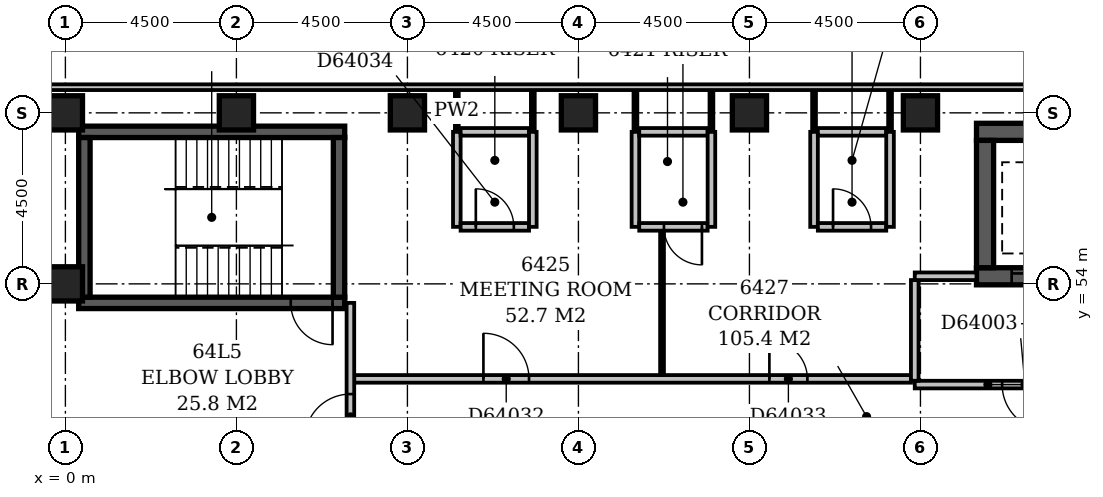
"""IFC4 building model, lengths in metres.
Left out: names, types, materials, properties, quantities, classifications, styles, units other than length and angle.
Written with IfcOpenShell. Run it as: python <this file> out.ifc"""

import sys

from ifc_helpers import new_model, si_unit, direction, frame, frame_2d, origin, origin_2d, place, context, subcontext, project, spatial, rectangle, extrude, element, fill, save


model = new_model("IFC4")
c1 = context("Model", 3, precision=1e-05, world=origin(), true_north=direction((0.0, 1.0)))
c2 = subcontext(c1, "Body", "Model", "MODEL_VIEW")
j1 = project(units=[si_unit("LENGTHUNIT", "METRE"), si_unit("PLANEANGLEUNIT", "RADIAN")], contexts=[c1])
p1 = place(None, origin())
s1 = spatial("IfcSite", under=j1, at=p1, CompositionType="ELEMENT")
p2 = place(p1, origin())
s2 = spatial("IfcBuilding", under=s1, at=p2, CompositionType="ELEMENT")
p3 = place(p2, frame((0.0, 0.0, 247.4)))
s3 = spatial("IfcBuildingStorey", under=s2, at=p3, CompositionType="ELEMENT", Elevation=247.4)
p4 = place(p3, frame((0.35, 53.5, -0.3), z_axis=(0.0, 0.0, 1.0), x_axis=(1.0, 0.0, 0.0)))
e1 = element("IfcWall", 1, at=p4, inside=s3, PredefinedType="SHEAR", context=c2, shape_type="SweptSolid", body=[
    extrude(rectangle(XDim=7.0, YDim=0.3, at=frame_2d((3.5, 0.0))), origin(), (0.0, 0.0, 1.0), 3.6),
])
p5 = place(p4, frame((5.58, 0.0, 0.3)))
e2 = element("IfcOpeningElement", 2, at=p5, cuts=e1, PredefinedType="OPENING", context=c2, shape_type="SweptSolid", body=[
    extrude(rectangle(XDim=1.1, YDim=2.1, at=frame_2d((0.55, 1.05))), frame((0.0, 0.162, 0.0), z_axis=(0.0, -1.0, 0.0), x_axis=(1.0, 0.0, 0.0)), (0.0, 0.0, 1.0), 0.324),
])
p6 = place(p3, frame((0.35, 58.0, -0.3), z_axis=(0.0, 0.0, 1.0), x_axis=(1.0, 0.0, 0.0)))
e3 = element("IfcWall", 3, at=p6, inside=s3, PredefinedType="SHEAR", context=c2, shape_type="SweptSolid", body=[
    extrude(rectangle(XDim=7.0, YDim=0.3, at=frame_2d((3.5, 0.0))), origin(), (0.0, 0.0, 1.0), 3.6),
])
for number, where, z_axis, x_axis in (
    (4, (0.5, 53.65, -0.3), (0.0, 0.0, 1.0), (0.0, 1.0, 0.0)),
    (5, (7.2, 53.65, -0.3), (0.0, 0.0, 1.0), (0.0, 1.0, 0.0)),
):
    element("IfcWall", number, at=place(p3, frame(where, z_axis=z_axis, x_axis=x_axis)), inside=s3, PredefinedType="SHEAR", context=c2, shape_type="SweptSolid", body=[
        extrude(rectangle(XDim=4.2, YDim=0.3, at=frame_2d((2.1, 0.0))), origin(), (0.0, 0.0, 1.0), 3.6),
    ])
p7 = place(p3, frame((23.975, 54.2, -0.3), z_axis=(0.0, 0.0, 1.0), x_axis=(1.0, 0.0, 0.0)))
e6 = element("IfcWall", 6, at=p7, inside=s3, PredefinedType="SHEAR", context=c2, shape_type="SweptSolid", body=[
    extrude(rectangle(XDim=2.95, YDim=0.45, at=frame_2d((1.475, 0.0))), origin(), (0.0, 0.0, 1.0), 3.6),
])
p8 = place(p7, frame((0.925, 0.0, 0.3)))
e7 = element("IfcOpeningElement", 7, at=p8, cuts=e6, PredefinedType="OPENING", context=c2, shape_type="SweptSolid", body=[
    extrude(rectangle(XDim=1.1, YDim=2.1, at=frame_2d((0.55, 1.05))), frame((0.0, 0.237, 0.0), z_axis=(0.0, -1.0, 0.0), x_axis=(1.0, 0.0, 0.0)), (0.0, 0.0, 1.0), 0.474),
])
p9 = place(p3, frame((23.975, 58.0, -0.3), z_axis=(0.0, 0.0, 1.0), x_axis=(1.0, 0.0, 0.0)))
e8 = element("IfcWall", 8, at=p9, inside=s3, PredefinedType="SHEAR", context=c2, shape_type="SweptSolid", body=[
    extrude(rectangle(XDim=2.95, YDim=0.45, at=frame_2d((1.475, 0.0))), origin(), (0.0, 0.0, 1.0), 3.6),
])
p10 = place(p3, frame((24.2, 54.425, -0.3), z_axis=(0.0, 0.0, 1.0), x_axis=(0.0, 1.0, 0.0)))
e9 = element("IfcWall", 9, at=p10, inside=s3, PredefinedType="SHEAR", context=c2, shape_type="SweptSolid", body=[
    extrude(rectangle(XDim=3.35, YDim=0.45, at=frame_2d((1.675, 0.0))), origin(), (0.0, 0.0, 1.0), 3.6),
])
for number, where, z_axis, x_axis in (
    (10, (0.0, 54.0, -0.3), (0.0, 0.0, 1.0), (1.0, 0.0, 0.0)),
    (11, (0.0, 58.5, -0.3), (0.0, 0.0, 1.0), (1.0, 0.0, 0.0)),
    (12, (4.5, 58.5, -0.3), (0.0, 0.0, 1.0), (1.0, 0.0, 0.0)),
    (13, (9.0, 58.5, -0.3), (0.0, 0.0, 1.0), (1.0, 0.0, 0.0)),
    (14, (13.5, 58.5, -0.3), (0.0, 0.0, 1.0), (1.0, 0.0, 0.0)),
    (15, (18.0, 58.5, -0.3), (0.0, 0.0, 1.0), (1.0, 0.0, 0.0)),
    (16, (22.5, 58.5, -0.3), (0.0, 0.0, 1.0), (1.0, 0.0, 0.0)),
):
    element("IfcColumn", number, at=place(p3, frame(where, z_axis=z_axis, x_axis=x_axis)), inside=s3, PredefinedType="COLUMN", context=c2, shape_type="SweptSolid", body=[
        extrude(rectangle(XDim=0.9, YDim=0.9, at=origin_2d()), origin(), (0.0, 0.0, 1.0), 3.6),
    ])
p11 = place(p3, frame((27.0, 59.175, 0.0), z_axis=(0.0, 0.0, 1.0), x_axis=(-1.0, 0.0, 0.0)))
e17 = element("IfcWall", 17, at=p11, inside=s3, PredefinedType="STANDARD", context=c2, shape_type="SweptSolid", body=[
    extrude(rectangle(XDim=27.75, YDim=0.15, at=frame_2d((13.875, 0.0))), origin(), (0.0, 0.0, 1.0), 2.7),
])
p12 = place(p3, frame((22.35, 51.35, 0.0), z_axis=(0.0, 0.0, 1.0), x_axis=(1.0, 0.0, 0.0)))
e18 = element("IfcWall", 18, at=p12, inside=s3, PredefinedType="PARTITIONING", context=c2, shape_type="SweptSolid", body=[
    extrude(rectangle(XDim=3.85, YDim=0.2, at=frame_2d((1.925, 0.0))), origin(), (0.0, 0.0, 1.0), 3.3),
])
p13 = place(p12, frame((2.3, 0.0, 0.0)))
e19 = element("IfcOpeningElement", 19, at=p13, cuts=e18, PredefinedType="OPENING", context=c2, shape_type="SweptSolid", body=[
    extrude(rectangle(XDim=1.2, YDim=2.1, at=frame_2d((0.6, 1.05))), frame((0.0, 0.112, 0.0), z_axis=(0.0, -1.0, 0.0), x_axis=(1.0, 0.0, 0.0)), (0.0, 0.0, 1.0), 0.224),
])
p14 = place(p3, frame((22.35, 54.2, 0.0), z_axis=(0.0, 0.0, 1.0), x_axis=(1.0, 0.0, 0.0)))
e20 = element("IfcWall", 20, at=p14, inside=s3, PredefinedType="PARTITIONING", context=c2, shape_type="SweptSolid", body=[
    extrude(rectangle(XDim=1.625, YDim=0.2, at=frame_2d((0.812, 0.0))), origin(), (0.0, 0.0, 1.0), 3.3),
])
p15 = place(p3, frame((22.35, 51.45, 0.0), z_axis=(0.0, 0.0, 1.0), x_axis=(0.0, 1.0, 0.0)))
e21 = element("IfcWall", 21, at=p15, inside=s3, PredefinedType="PARTITIONING", context=c2, shape_type="SweptSolid", body=[
    extrude(rectangle(XDim=2.65, YDim=0.2, at=frame_2d((1.325, 0.0))), origin(), (0.0, 0.0, 1.0), 3.3),
])
p16 = place(p3, frame((7.5, 49.6, 0.0), z_axis=(0.0, 0.0, 1.0), x_axis=(0.0, 1.0, 0.0)))
e22 = element("IfcWall", 22, at=p16, inside=s3, PredefinedType="PARTITIONING", context=c2, shape_type="SweptSolid", body=[
    extrude(rectangle(XDim=3.9, YDim=0.2, at=frame_2d((1.95, 0.0))), origin(), (0.0, 0.0, 1.0), 3.3),
])
p17 = place(p16, frame((0.3, 0.0, 0.0)))
e23 = element("IfcOpeningElement", 23, at=p17, cuts=e22, PredefinedType="OPENING", context=c2, shape_type="SweptSolid", body=[
    extrude(rectangle(XDim=1.2, YDim=2.1, at=frame_2d((0.6, 1.05))), frame((0.0, 0.112, 0.0), z_axis=(0.0, -1.0, 0.0), x_axis=(1.0, 0.0, 0.0)), (0.0, 0.0, 1.0), 0.224),
])
p18 = place(p3, frame((7.6, 51.5, 0.0), z_axis=(0.0, 0.0, 1.0), x_axis=(1.0, 0.0, 0.0)))
e24 = element("IfcWall", 24, at=p18, inside=s3, PredefinedType="PARTITIONING", context=c2, shape_type="SweptSolid", body=[
    extrude(rectangle(XDim=14.65, YDim=0.2, at=frame_2d((7.325, 0.0))), origin(), (0.0, 0.0, 1.0), 3.3),
])
p19 = place(p18, frame((3.4, 0.0, 0.0)))
e25 = element("IfcOpeningElement", 25, at=p19, cuts=e24, PredefinedType="OPENING", context=c2, shape_type="SweptSolid", body=[
    extrude(rectangle(XDim=1.2, YDim=2.1, at=frame_2d((0.6, 1.05))), frame((0.0, 0.112, 0.0), z_axis=(0.0, -1.0, 0.0), x_axis=(1.0, 0.0, 0.0)), (0.0, 0.0, 1.0), 0.224),
])
p20 = place(p18, frame((10.925, 0.0, 0.0)))
e26 = element("IfcOpeningElement", 26, at=p20, cuts=e24, PredefinedType="OPENING", context=c2, shape_type="SweptSolid", body=[
    extrude(rectangle(XDim=1.0, YDim=2.1, at=frame_2d((0.5, 1.05))), frame((0.0, 0.112, 0.0), z_axis=(0.0, -1.0, 0.0), x_axis=(1.0, 0.0, 0.0)), (0.0, 0.0, 1.0), 0.224),
])
p21 = place(p3, frame((15.7, 51.6, 0.0), z_axis=(0.0, 0.0, 1.0), x_axis=(0.0, 1.0, 0.0)))
e27 = element("IfcWall", 27, at=p21, inside=s3, PredefinedType="PARTITIONING", context=c2, shape_type="SweptSolid", body=[
    extrude(rectangle(XDim=3.8, YDim=0.1, at=frame_2d((1.9, 0.0))), origin(), (0.0, 0.0, 1.0), 3.3),
])
p22 = place(p3, frame((10.3, 55.5, 0.0), z_axis=(0.0, 0.0, 1.0), x_axis=(0.0, 1.0, 0.0)))
e28 = element("IfcWall", 28, at=p22, inside=s3, PredefinedType="PARTITIONING", context=c2, shape_type="SweptSolid", body=[
    extrude(rectangle(XDim=2.5, YDim=0.2, at=frame_2d((1.25, 0.0))), origin(), (0.0, 0.0, 1.0), 3.3),
])
p23 = place(p3, frame((10.4, 55.5, 0.0), z_axis=(0.0, 0.0, 1.0), x_axis=(1.0, 0.0, 0.0)))
e29 = element("IfcWall", 29, at=p23, inside=s3, PredefinedType="PARTITIONING", context=c2, shape_type="SweptSolid", body=[
    extrude(rectangle(XDim=1.8, YDim=0.2, at=frame_2d((0.9, 0.0))), origin(), (0.0, 0.0, 1.0), 3.3),
])
p24 = place(p23, frame((0.4, 0.0, 0.0)))
e30 = element("IfcOpeningElement", 30, at=p24, cuts=e29, PredefinedType="OPENING", context=c2, shape_type="SweptSolid", body=[
    extrude(rectangle(XDim=1.0, YDim=2.1, at=frame_2d((0.5, 1.05))), frame((0.0, 0.112, 0.0), z_axis=(0.0, -1.0, 0.0), x_axis=(1.0, 0.0, 0.0)), (0.0, 0.0, 1.0), 0.224),
])
for number, where, z_axis, x_axis in (
    (31, (12.3, 55.5, 0.0), (0.0, 0.0, 1.0), (0.0, 1.0, 0.0)),
    (32, (15.0, 55.5, 0.0), (0.0, 0.0, 1.0), (0.0, 1.0, 0.0)),
):
    element("IfcWall", number, at=place(p3, frame(where, z_axis=z_axis, x_axis=x_axis)), inside=s3, PredefinedType="PARTITIONING", context=c2, shape_type="SweptSolid", body=[
        extrude(rectangle(XDim=2.5, YDim=0.2, at=frame_2d((1.25, 0.0))), origin(), (0.0, 0.0, 1.0), 3.3),
    ])
p25 = place(p3, frame((15.1, 55.5, 0.0), z_axis=(0.0, 0.0, 1.0), x_axis=(1.0, 0.0, 0.0)))
e33 = element("IfcWall", 33, at=p25, inside=s3, PredefinedType="PARTITIONING", context=c2, shape_type="SweptSolid", body=[
    extrude(rectangle(XDim=1.8, YDim=0.2, at=frame_2d((0.9, 0.0))), origin(), (0.0, 0.0, 1.0), 3.3),
])
p26 = place(p25, frame((0.65, 0.0, 0.0)))
e34 = element("IfcOpeningElement", 34, at=p26, cuts=e33, PredefinedType="OPENING", context=c2, shape_type="SweptSolid", body=[
    extrude(rectangle(XDim=1.0, YDim=2.1, at=frame_2d((0.5, 1.05))), frame((0.0, 0.112, 0.0), z_axis=(0.0, -1.0, 0.0), x_axis=(1.0, 0.0, 0.0)), (0.0, 0.0, 1.0), 0.224),
])
for number, where, z_axis, x_axis in (
    (35, (17.0, 55.5, 0.0), (0.0, 0.0, 1.0), (0.0, 1.0, 0.0)),
    (36, (19.7, 55.5, 0.0), (0.0, 0.0, 1.0), (0.0, 1.0, 0.0)),
):
    element("IfcWall", number, at=place(p3, frame(where, z_axis=z_axis, x_axis=x_axis)), inside=s3, PredefinedType="PARTITIONING", context=c2, shape_type="SweptSolid", body=[
        extrude(rectangle(XDim=2.5, YDim=0.2, at=frame_2d((1.25, 0.0))), origin(), (0.0, 0.0, 1.0), 3.3),
    ])
p27 = place(p3, frame((19.8, 55.5, 0.0), z_axis=(0.0, 0.0, 1.0), x_axis=(1.0, 0.0, 0.0)))
e37 = element("IfcWall", 37, at=p27, inside=s3, PredefinedType="PARTITIONING", context=c2, shape_type="SweptSolid", body=[
    extrude(rectangle(XDim=1.8, YDim=0.2, at=frame_2d((0.9, 0.0))), origin(), (0.0, 0.0, 1.0), 3.3),
])
p28 = place(p27, frame((0.4, 0.0, 0.0)))
e38 = element("IfcOpeningElement", 38, at=p28, cuts=e37, PredefinedType="OPENING", context=c2, shape_type="SweptSolid", body=[
    extrude(rectangle(XDim=1.0, YDim=2.1, at=frame_2d((0.5, 1.05))), frame((0.0, 0.112, 0.0), z_axis=(0.0, -1.0, 0.0), x_axis=(1.0, 0.0, 0.0)), (0.0, 0.0, 1.0), 0.224),
])
p29 = place(p3, frame((21.7, 55.5, 0.0), z_axis=(0.0, 0.0, 1.0), x_axis=(0.0, 1.0, 0.0)))
e39 = element("IfcWall", 39, at=p29, inside=s3, PredefinedType="PARTITIONING", context=c2, shape_type="SweptSolid", body=[
    extrude(rectangle(XDim=2.5, YDim=0.2, at=frame_2d((1.25, 0.0))), origin(), (0.0, 0.0, 1.0), 3.3),
])
p30 = place(p3, frame((10.3, 58.0, 0.0), z_axis=(0.0, 0.0, 1.0), x_axis=(0.0, 1.0, 0.0)))
e40 = element("IfcWall", 40, at=p30, inside=s3, PredefinedType="PARTITIONING", context=c2, shape_type="SweptSolid", body=[
    extrude(rectangle(XDim=1.1, YDim=0.1, at=frame_2d((0.55, 0.0))), origin(), (0.0, 0.0, 1.0), 3.3),
])
p31 = place(p3, frame((10.4, 58.0, 0.0), z_axis=(0.0, 0.0, 1.0), x_axis=(1.0, 0.0, 0.0)))
e41 = element("IfcWall", 41, at=p31, inside=s3, PredefinedType="PARTITIONING", context=c2, shape_type="SweptSolid", body=[
    extrude(rectangle(XDim=1.8, YDim=0.2, at=frame_2d((0.9, 0.0))), origin(), (0.0, 0.0, 1.0), 3.3),
])
for number, where, z_axis, x_axis in (
    (42, (12.3, 58.0, 0.0), (0.0, 0.0, 1.0), (0.0, 1.0, 0.0)),
    (43, (15.0, 58.0, 0.0), (0.0, 0.0, 1.0), (0.0, 1.0, 0.0)),
):
    element("IfcWall", number, at=place(p3, frame(where, z_axis=z_axis, x_axis=x_axis)), inside=s3, PredefinedType="PARTITIONING", context=c2, shape_type="SweptSolid", body=[
        extrude(rectangle(XDim=1.1, YDim=0.1, at=frame_2d((0.55, 0.0))), origin(), (0.0, 0.0, 1.0), 3.3),
    ])
p32 = place(p3, frame((15.1, 58.0, 0.0), z_axis=(0.0, 0.0, 1.0), x_axis=(1.0, 0.0, 0.0)))
e44 = element("IfcWall", 44, at=p32, inside=s3, PredefinedType="PARTITIONING", context=c2, shape_type="SweptSolid", body=[
    extrude(rectangle(XDim=1.8, YDim=0.2, at=frame_2d((0.9, 0.0))), origin(), (0.0, 0.0, 1.0), 3.3),
])
for number, where, z_axis, x_axis in (
    (45, (17.0, 58.0, 0.0), (0.0, 0.0, 1.0), (0.0, 1.0, 0.0)),
    (46, (19.7, 58.0, 0.0), (0.0, 0.0, 1.0), (0.0, 1.0, 0.0)),
):
    element("IfcWall", number, at=place(p3, frame(where, z_axis=z_axis, x_axis=x_axis)), inside=s3, PredefinedType="PARTITIONING", context=c2, shape_type="SweptSolid", body=[
        extrude(rectangle(XDim=1.1, YDim=0.1, at=frame_2d((0.55, 0.0))), origin(), (0.0, 0.0, 1.0), 3.3),
    ])
p33 = place(p3, frame((19.8, 58.0, 0.0), z_axis=(0.0, 0.0, 1.0), x_axis=(1.0, 0.0, 0.0)))
e47 = element("IfcWall", 47, at=p33, inside=s3, PredefinedType="PARTITIONING", context=c2, shape_type="SweptSolid", body=[
    extrude(rectangle(XDim=1.8, YDim=0.2, at=frame_2d((0.9, 0.0))), origin(), (0.0, 0.0, 1.0), 3.3),
])
p34 = place(p3, frame((21.7, 58.0, 0.0), z_axis=(0.0, 0.0, 1.0), x_axis=(0.0, 1.0, 0.0)))
e48 = element("IfcWall", 48, at=p34, inside=s3, PredefinedType="PARTITIONING", context=c2, shape_type="SweptSolid", body=[
    extrude(rectangle(XDim=1.1, YDim=0.1, at=frame_2d((0.55, 0.0))), origin(), (0.0, 0.0, 1.0), 3.3),
])
p35 = place(p17, origin())
e49 = element("IfcDoor", 49, at=p35, inside=s3, OperationType="SINGLE_SWING_LEFT", PredefinedType="DOOR", context=c2, shape_type="SweptSolid", body=[
    extrude(rectangle(XDim=1.2, YDim=2.1, at=frame_2d((0.6, 1.05))), frame((0.0, 0.025, 0.0), z_axis=(0.0, -1.0, 0.0), x_axis=(1.0, 0.0, 0.0)), (0.0, 0.0, 1.0), 0.05),
])
fill(e23, e49)
p36 = place(p13, origin())
e50 = element("IfcDoor", 50, at=p36, inside=s3, OperationType="SINGLE_SWING_RIGHT", PredefinedType="DOOR", context=c2, shape_type="SweptSolid", body=[
    extrude(rectangle(XDim=1.2, YDim=2.1, at=frame_2d((0.6, 1.05))), frame((0.0, 0.025, 0.0), z_axis=(0.0, -1.0, 0.0), x_axis=(1.0, 0.0, 0.0)), (0.0, 0.0, 1.0), 0.05),
])
fill(e19, e50)
p37 = place(p8, origin())
e51 = element("IfcDoor", 51, at=p37, inside=s3, OperationType="SLIDING_TO_LEFT", PredefinedType="DOOR", context=c2, shape_type="SweptSolid", body=[
    extrude(rectangle(XDim=1.1, YDim=2.1, at=frame_2d((0.55, 1.05))), frame((0.0, 0.025, 0.0), z_axis=(0.0, -1.0, 0.0), x_axis=(1.0, 0.0, 0.0)), (0.0, 0.0, 1.0), 0.05),
])
fill(e7, e51)
p38 = place(p5, origin())
e52 = element("IfcDoor", 52, at=p38, inside=s3, OperationType="SINGLE_SWING_RIGHT", PredefinedType="DOOR", context=c2, shape_type="SweptSolid", body=[
    extrude(rectangle(XDim=1.1, YDim=2.1, at=frame_2d((0.55, 1.05))), frame((0.0, 0.025, 0.0), z_axis=(0.0, -1.0, 0.0), x_axis=(1.0, 0.0, 0.0)), (0.0, 0.0, 1.0), 0.05),
])
fill(e2, e52)
p39 = place(p19, origin())
e53 = element("IfcDoor", 53, at=p39, inside=s3, OperationType="SINGLE_SWING_LEFT", PredefinedType="DOOR", context=c2, shape_type="SweptSolid", body=[
    extrude(rectangle(XDim=1.2, YDim=2.1, at=frame_2d((0.6, 1.05))), frame((0.0, 0.025, 0.0), z_axis=(0.0, -1.0, 0.0), x_axis=(1.0, 0.0, 0.0)), (0.0, 0.0, 1.0), 0.05),
])
fill(e25, e53)
p40 = place(p20, origin())
e54 = element("IfcDoor", 54, at=p40, inside=s3, OperationType="SINGLE_SWING_LEFT", PredefinedType="DOOR", context=c2, shape_type="SweptSolid", body=[
    extrude(rectangle(XDim=1.0, YDim=2.1, at=frame_2d((0.5, 1.05))), frame((0.0, 0.025, 0.0), z_axis=(0.0, -1.0, 0.0), x_axis=(1.0, 0.0, 0.0)), (0.0, 0.0, 1.0), 0.05),
])
fill(e26, e54)
p41 = place(p24, origin())
e55 = element("IfcDoor", 55, at=p41, inside=s3, OperationType="SINGLE_SWING_LEFT", PredefinedType="DOOR", context=c2, shape_type="SweptSolid", body=[
    extrude(rectangle(XDim=1.0, YDim=2.1, at=frame_2d((0.5, 1.05))), frame((0.0, 0.025, 0.0), z_axis=(0.0, -1.0, 0.0), x_axis=(1.0, 0.0, 0.0)), (0.0, 0.0, 1.0), 0.05),
])
fill(e30, e55)
p42 = place(p26, origin())
e56 = element("IfcDoor", 56, at=p42, inside=s3, OperationType="SINGLE_SWING_RIGHT", PredefinedType="DOOR", context=c2, shape_type="SweptSolid", body=[
    extrude(rectangle(XDim=1.0, YDim=2.1, at=frame_2d((0.5, 1.05))), frame((0.0, 0.025, 0.0), z_axis=(0.0, -1.0, 0.0), x_axis=(1.0, 0.0, 0.0)), (0.0, 0.0, 1.0), 0.05),
])
fill(e34, e56)
p43 = place(p28, origin())
e57 = element("IfcDoor", 57, at=p43, inside=s3, OperationType="SINGLE_SWING_LEFT", PredefinedType="DOOR", context=c2, shape_type="SweptSolid", body=[
    extrude(rectangle(XDim=1.0, YDim=2.1, at=frame_2d((0.5, 1.05))), frame((0.0, 0.025, 0.0), z_axis=(0.0, -1.0, 0.0), x_axis=(1.0, 0.0, 0.0)), (0.0, 0.0, 1.0), 0.05),
])
fill(e38, e57)
save(model, sys.argv[1])
